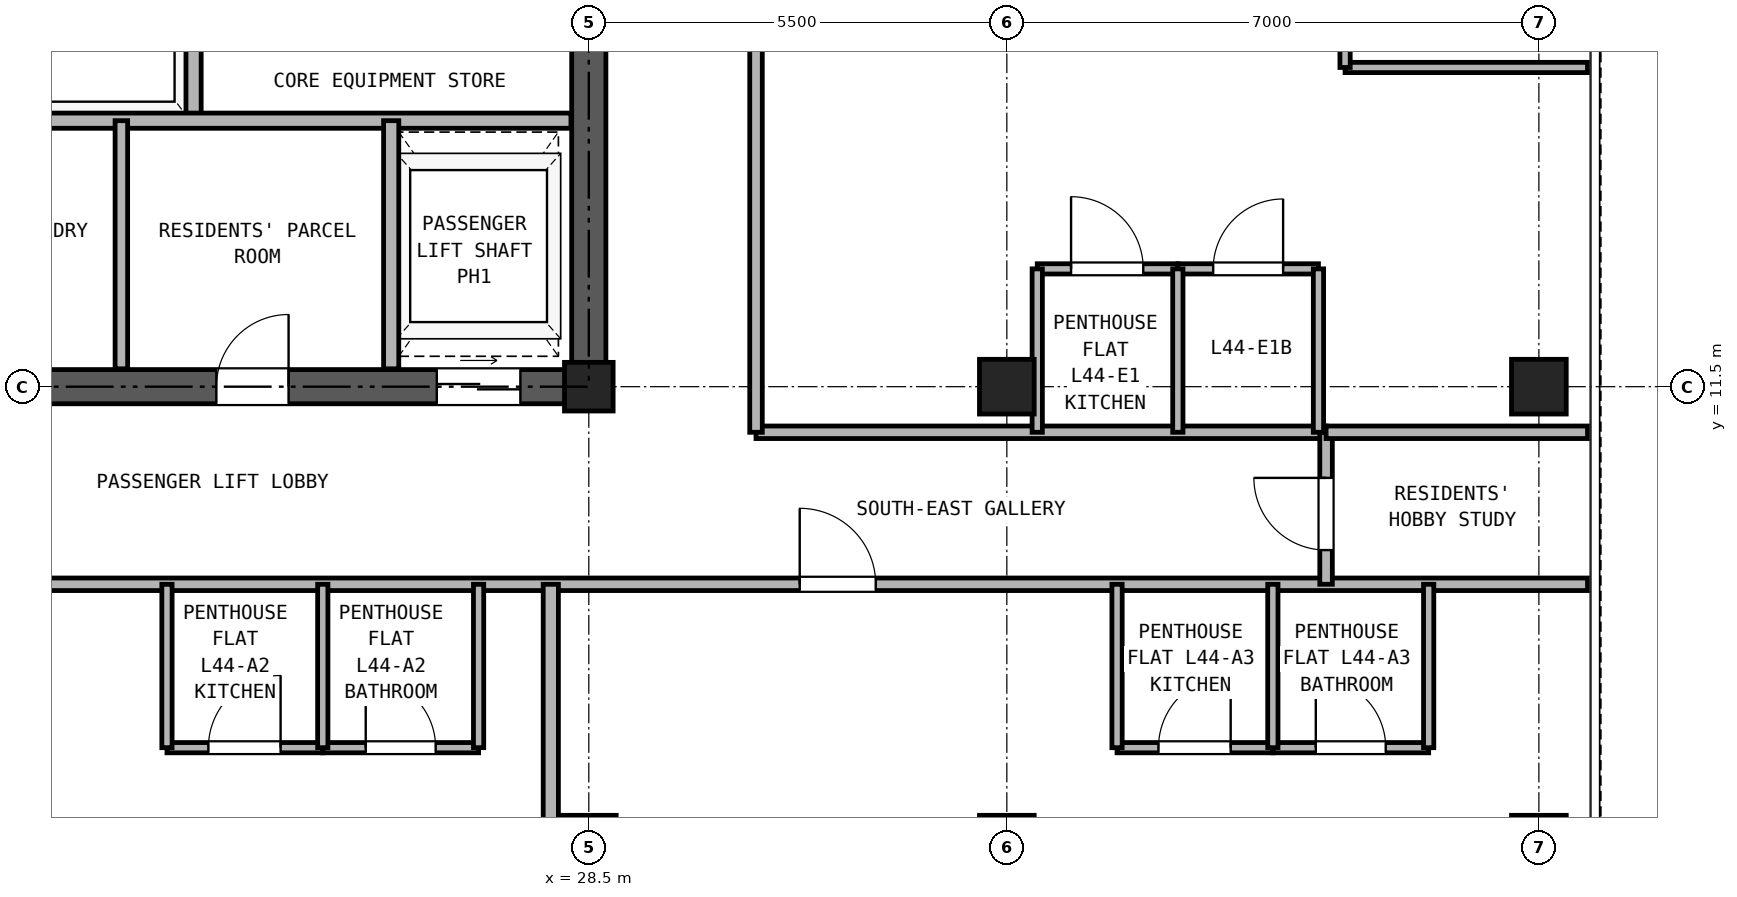
"""IFC4 building model, lengths in metres.
Left out: names, types, materials, properties, quantities, classifications, styles, units other than length and angle.
Written with IfcOpenShell. Run it as: python <this file> out.ifc"""

import sys

from ifc_helpers import new_model, si_unit, direction, frame, frame_2d, origin, origin_2d, place, context, subcontext, project, spatial, rectangle, hollow_rectangle, extrude, source, transform, mapped, element, fill, save


model = new_model("IFC4")
c1 = context("Model", 3, precision=1e-05, world=origin(), true_north=direction((0.0, 1.0)))
c2 = subcontext(c1, "Body", "Model", "MODEL_VIEW")
j1 = project(units=[si_unit("LENGTHUNIT", "METRE"), si_unit("PLANEANGLEUNIT", "RADIAN")], contexts=[c1])
p1 = place(None, origin())
s1 = spatial("IfcSite", under=j1, at=p1, CompositionType="ELEMENT")
p2 = place(p1, origin())
s2 = spatial("IfcBuilding", under=s1, at=p2, CompositionType="ELEMENT")
p3 = place(p2, frame((0.0, 0.0, 159.3)))
s3 = spatial("IfcBuildingStorey", under=s2, at=p3, CompositionType="ELEMENT", Elevation=159.3)
m1 = source(origin(), c2, "Body", "SweptSolid", [
    extrude(hollow_rectangle(XDim=0.72, YDim=0.72, WallThickness=0.04, at=origin_2d()), origin(), (0.0, 0.0, 1.0), 2.95),
])
for number, where, z_axis, x_axis in (
    (1, (41.0, 5.5, 0.0), (0.0, 0.0, 1.0), (1.0, 0.0, 0.0)),
    (2, (41.0, 11.5, 0.0), (0.0, 0.0, 1.0), (1.0, 0.0, 0.0)),
    (3, (28.5, 5.5, 0.0), (0.0, 0.0, 1.0), (1.0, 0.0, 0.0)),
):
    element("IfcColumn", number, at=place(p3, frame(where, z_axis=z_axis, x_axis=x_axis)), inside=s3, PredefinedType="COLUMN", context=c2, shape_type="MappedRepresentation", body=[
        mapped(m1, transform((0.0, 0.0, 0.0), x_axis=(1.0, 0.0, 0.0), y_axis=(0.0, 1.0, 0.0), z_axis=(0.0, 0.0, 1.0), scale=1.0)),
    ])
m2 = source(origin(), c2, "Body", "SweptSolid", [
    extrude(hollow_rectangle(XDim=0.64, YDim=0.64, WallThickness=0.035, at=origin_2d()), origin(), (0.0, 0.0, 1.0), 2.95),
])
p4 = place(p3, frame((28.5, 11.5, 0.0), z_axis=(0.0, 0.0, 1.0), x_axis=(1.0, 0.0, 0.0)))
e4 = element("IfcColumn", 4, at=p4, inside=s3, PredefinedType="COLUMN", context=c2, shape_type="MappedRepresentation", body=[
    mapped(m2, transform((0.0, 0.0, 0.0), x_axis=(1.0, 0.0, 0.0), y_axis=(0.0, 1.0, 0.0), z_axis=(0.0, 0.0, 1.0), scale=1.0)),
])
for number, where, z_axis, x_axis in (
    (5, (34.0, 5.5, 0.0), (0.0, 0.0, 1.0), (1.0, 0.0, 0.0)),
    (6, (34.0, 11.5, 0.0), (0.0, 0.0, 1.0), (1.0, 0.0, 0.0)),
):
    element("IfcColumn", number, at=place(p3, frame(where, z_axis=z_axis, x_axis=x_axis)), inside=s3, PredefinedType="COLUMN", context=c2, shape_type="MappedRepresentation", body=[
        mapped(m1, transform((0.0, 0.0, 0.0), x_axis=(1.0, 0.0, 0.0), y_axis=(0.0, 1.0, 0.0), z_axis=(0.0, 0.0, 1.0), scale=1.0)),
    ])
p5 = place(p3, frame((18.275, 11.5, 0.0), z_axis=(0.0, 0.0, 1.0), x_axis=(1.0, 0.0, 0.0)))
e7 = element("IfcWall", 7, at=p5, inside=s3, PredefinedType="SHEAR", context=c2, shape_type="SweptSolid", body=[
    extrude(rectangle(XDim=10.45, YDim=0.45, at=frame_2d((5.225, 0.0))), origin(), (0.0, 0.0, 1.0), 2.95),
])
p6 = place(p5, frame((1.825, 0.0, 0.0)))
e8 = element("IfcOpeningElement", 8, at=p6, cuts=e7, PredefinedType="OPENING", context=c2, shape_type="SweptSolid", body=[
    extrude(rectangle(XDim=0.95, YDim=2.15, at=frame_2d((0.475, 1.075))), frame((0.0, 0.235, 0.0), z_axis=(0.0, -1.0, 0.0), x_axis=(1.0, 0.0, 0.0)), (0.0, 0.0, 1.0), 0.47),
])
p7 = place(p5, frame((5.325, 0.0, 0.0)))
e9 = element("IfcOpeningElement", 9, at=p7, cuts=e7, PredefinedType="OPENING", context=c2, shape_type="SweptSolid", body=[
    extrude(rectangle(XDim=0.95, YDim=2.15, at=frame_2d((0.475, 1.075))), frame((0.0, 0.235, 0.0), z_axis=(0.0, -1.0, 0.0), x_axis=(1.0, 0.0, 0.0)), (0.0, 0.0, 1.0), 0.47),
])
p8 = place(p5, frame((8.225, 0.0, 0.0)))
e10 = element("IfcOpeningElement", 10, at=p8, cuts=e7, PredefinedType="OPENING", context=c2, shape_type="SweptSolid", body=[
    extrude(rectangle(XDim=1.1, YDim=2.25, at=frame_2d((0.55, 1.125))), frame((0.0, 0.235, 0.0), z_axis=(0.0, -1.0, 0.0), x_axis=(1.0, 0.0, 0.0)), (0.0, 0.0, 1.0), 0.47),
])
p9 = place(p3, frame((28.5, 11.725, 0.0), z_axis=(0.0, 0.0, 1.0), x_axis=(0.0, 1.0, 0.0)))
e11 = element("IfcWall", 11, at=p9, inside=s3, PredefinedType="SHEAR", context=c2, shape_type="SweptSolid", body=[
    extrude(rectangle(XDim=16.8, YDim=0.45, at=frame_2d((8.4, 0.0))), origin(), (0.0, 0.0, 1.0), 2.95),
])
p10 = place(p9, frame((7.425, 0.0, 0.0)))
e12 = element("IfcOpeningElement", 12, at=p10, cuts=e11, PredefinedType="OPENING", context=c2, shape_type="SweptSolid", body=[
    extrude(rectangle(XDim=1.15, YDim=2.2, at=frame_2d((0.575, 1.1))), frame((0.0, 0.235, 0.0), z_axis=(0.0, -1.0, 0.0), x_axis=(1.0, 0.0, 0.0)), (0.0, 0.0, 1.0), 0.47),
])
p11 = place(p3, frame((23.3, 15.0, 0.0), z_axis=(0.0, 0.0, 1.0), x_axis=(0.0, 1.0, 0.0)))
e13 = element("IfcWall", 13, at=p11, inside=s3, PredefinedType="PARTITIONING", context=c2, shape_type="SweptSolid", body=[
    extrude(rectangle(XDim=3.0, YDim=0.2, at=frame_2d((1.5, 0.0))), origin(), (0.0, 0.0, 1.0), 2.95),
])
p12 = place(p3, frame((18.735, 15.0, 0.0), z_axis=(0.0, 0.0, 1.0), x_axis=(1.0, 0.0, 0.0)))
e14 = element("IfcWall", 14, at=p12, inside=s3, PredefinedType="PARTITIONING", context=c2, shape_type="SweptSolid", body=[
    extrude(rectangle(XDim=9.53, YDim=0.2, at=frame_2d((4.765, 0.0))), origin(), (0.0, 0.0, 1.0), 2.95),
])
p13 = place(p3, frame((22.35, 11.735, 0.0), z_axis=(0.0, 0.0, 1.0), x_axis=(0.0, 1.0, 0.0)))
e15 = element("IfcWall", 15, at=p13, inside=s3, PredefinedType="PARTITIONING", context=c2, shape_type="SweptSolid", body=[
    extrude(rectangle(XDim=3.265, YDim=0.165, at=frame_2d((1.632, 0.0))), origin(), (0.0, 0.0, 1.0), 2.95),
])
p14 = place(p3, frame((25.9, 11.735, 0.0), z_axis=(0.0, 0.0, 1.0), x_axis=(0.0, 1.0, 0.0)))
e16 = element("IfcWall", 16, at=p14, inside=s3, PredefinedType="PARTITIONING", context=c2, shape_type="SweptSolid", body=[
    extrude(rectangle(XDim=3.265, YDim=0.2, at=frame_2d((1.632, 0.0))), origin(), (0.0, 0.0, 1.0), 2.95),
])
p15 = place(p3, frame((0.16, 8.9, 0.0), z_axis=(0.0, 0.0, 1.0), x_axis=(1.0, 0.0, 0.0)))
e17 = element("IfcWall", 17, at=p15, inside=s3, PredefinedType="PARTITIONING", context=c2, shape_type="SweptSolid", body=[
    extrude(rectangle(XDim=41.48, YDim=0.165, at=frame_2d((20.74, 0.0))), origin(), (0.0, 0.0, 1.0), 2.95),
])
p16 = place(p15, frame((12.165, 0.0, 0.0)))
e18 = element("IfcOpeningElement", 18, at=p16, cuts=e17, PredefinedType="OPENING", context=c2, shape_type="SweptSolid", body=[
    extrude(rectangle(XDim=1.0, YDim=2.15, at=frame_2d((0.5, 1.075))), frame((0.0, 0.093, 0.0), z_axis=(0.0, -1.0, 0.0), x_axis=(1.0, 0.0, 0.0)), (0.0, 0.0, 1.0), 0.185),
])
p17 = place(p15, frame((17.965, 0.0, 0.0)))
e19 = element("IfcOpeningElement", 19, at=p17, cuts=e17, PredefinedType="OPENING", context=c2, shape_type="SweptSolid", body=[
    extrude(rectangle(XDim=1.0, YDim=2.15, at=frame_2d((0.5, 1.075))), frame((0.0, 0.093, 0.0), z_axis=(0.0, -1.0, 0.0), x_axis=(1.0, 0.0, 0.0)), (0.0, 0.0, 1.0), 0.185),
])
p18 = place(p15, frame((31.115, 0.0, 0.0)))
e20 = element("IfcOpeningElement", 20, at=p18, cuts=e17, PredefinedType="OPENING", context=c2, shape_type="SweptSolid", body=[
    extrude(rectangle(XDim=1.0, YDim=2.15, at=frame_2d((0.5, 1.075))), frame((0.0, 0.093, 0.0), z_axis=(0.0, -1.0, 0.0), x_axis=(1.0, 0.0, 0.0)), (0.0, 0.0, 1.0), 0.185),
])
p19 = place(p3, frame((30.7, 10.9, 0.0), z_axis=(0.0, 0.0, 1.0), x_axis=(1.0, 0.0, 0.0)))
e21 = element("IfcWall", 21, at=p19, inside=s3, PredefinedType="PARTITIONING", context=c2, shape_type="SweptSolid", body=[
    extrude(rectangle(XDim=7.5, YDim=0.165, at=frame_2d((3.75, 0.0))), origin(), (0.0, 0.0, 1.0), 2.95),
])
p20 = place(p3, frame((38.2, 8.9, 0.0), z_axis=(0.0, 0.0, 1.0), x_axis=(0.0, 1.0, 0.0)))
e22 = element("IfcWall", 22, at=p20, inside=s3, PredefinedType="PARTITIONING", context=c2, shape_type="SweptSolid", body=[
    extrude(rectangle(XDim=2.0, YDim=0.165, at=frame_2d((1.0, 0.0))), origin(), (0.0, 0.0, 1.0), 2.95),
])
p21 = place(p20, frame((0.45, 0.0, 0.0)))
e23 = element("IfcOpeningElement", 23, at=p21, cuts=e22, PredefinedType="OPENING", context=c2, shape_type="SweptSolid", body=[
    extrude(rectangle(XDim=0.95, YDim=2.15, at=frame_2d((0.475, 1.075))), frame((0.0, 0.093, 0.0), z_axis=(0.0, -1.0, 0.0), x_axis=(1.0, 0.0, 0.0)), (0.0, 0.0, 1.0), 0.185),
])
p22 = place(p3, frame((30.7, 10.9, 0.0), z_axis=(0.0, 0.0, 1.0), x_axis=(0.0, 1.0, 0.0)))
e24 = element("IfcWall", 24, at=p22, inside=s3, PredefinedType="PARTITIONING", context=c2, shape_type="SweptSolid", body=[
    extrude(rectangle(XDim=24.24, YDim=0.165, at=frame_2d((12.12, 0.0))), origin(), (0.0, 0.0, 1.0), 2.95),
])
p23 = place(p22, frame((5.3, 0.0, 0.0)))
e25 = element("IfcOpeningElement", 25, at=p23, cuts=e24, PredefinedType="OPENING", context=c2, shape_type="SweptSolid", body=[
    extrude(rectangle(XDim=1.0, YDim=2.15, at=frame_2d((0.5, 1.075))), frame((0.0, 0.093, 0.0), z_axis=(0.0, -1.0, 0.0), x_axis=(1.0, 0.0, 0.0)), (0.0, 0.0, 1.0), 0.185),
])
p24 = place(p22, frame((15.05, 0.0, 0.0)))
e26 = element("IfcOpeningElement", 26, at=p24, cuts=e24, PredefinedType="OPENING", context=c2, shape_type="SweptSolid", body=[
    extrude(rectangle(XDim=1.0, YDim=2.15, at=frame_2d((0.5, 1.075))), frame((0.0, 0.093, 0.0), z_axis=(0.0, -1.0, 0.0), x_axis=(1.0, 0.0, 0.0)), (0.0, 0.0, 1.0), 0.185),
])
p25 = place(p3, frame((22.95, 6.75, 0.0), z_axis=(0.0, 0.0, 1.0), x_axis=(1.0, 0.0, 0.0)))
e27 = element("IfcWall", 27, at=p25, inside=s3, PredefinedType="PARTITIONING", context=c2, shape_type="SweptSolid", body=[
    extrude(rectangle(XDim=2.05, YDim=0.135, at=frame_2d((1.025, 0.0))), origin(), (0.0, 0.0, 1.0), 2.95),
])
p26 = place(p25, frame((0.545, 0.0, 0.0)))
e28 = element("IfcOpeningElement", 28, at=p26, cuts=e27, PredefinedType="OPENING", context=c2, shape_type="SweptSolid", body=[
    extrude(rectangle(XDim=0.95, YDim=2.15, at=frame_2d((0.475, 1.075))), frame((0.0, 0.077, 0.0), z_axis=(0.0, -1.0, 0.0), x_axis=(1.0, 0.0, 0.0)), (0.0, 0.0, 1.0), 0.155),
])
p27 = place(p3, frame((25.0, 6.75, 0.0), z_axis=(0.0, 0.0, 1.0), x_axis=(1.0, 0.0, 0.0)))
e29 = element("IfcWall", 29, at=p27, inside=s3, PredefinedType="PARTITIONING", context=c2, shape_type="SweptSolid", body=[
    extrude(rectangle(XDim=2.05, YDim=0.135, at=frame_2d((1.025, 0.0))), origin(), (0.0, 0.0, 1.0), 2.95),
])
p28 = place(p27, frame((0.565, 0.0, 0.0)))
e30 = element("IfcOpeningElement", 30, at=p28, cuts=e29, PredefinedType="OPENING", context=c2, shape_type="SweptSolid", body=[
    extrude(rectangle(XDim=0.92, YDim=2.1, at=frame_2d((0.46, 1.05))), frame((0.0, 0.077, 0.0), z_axis=(0.0, -1.0, 0.0), x_axis=(1.0, 0.0, 0.0)), (0.0, 0.0, 1.0), 0.155),
])
for number, where, z_axis, x_axis in (
    (31, (22.95, 6.75, 0.0), (0.0, 0.0, 1.0), (0.0, 1.0, 0.0)),
    (32, (25.0, 6.75, 0.0), (0.0, 0.0, 1.0), (0.0, 1.0, 0.0)),
    (33, (27.05, 6.75, 0.0), (0.0, 0.0, 1.0), (0.0, 1.0, 0.0)),
):
    element("IfcWall", number, at=place(p3, frame(where, z_axis=z_axis, x_axis=x_axis)), inside=s3, PredefinedType="PARTITIONING", context=c2, shape_type="SweptSolid", body=[
        extrude(rectangle(XDim=2.15, YDim=0.135, at=frame_2d((1.075, 0.0))), origin(), (0.0, 0.0, 1.0), 2.95),
    ])
p29 = place(p3, frame((28.0, 0.16, 0.0), z_axis=(0.0, 0.0, 1.0), x_axis=(0.0, 1.0, 0.0)))
e34 = element("IfcWall", 34, at=p29, inside=s3, PredefinedType="PARTITIONING", context=c2, shape_type="SweptSolid", body=[
    extrude(rectangle(XDim=8.74, YDim=0.2, at=frame_2d((4.37, 0.0))), origin(), (0.0, 0.0, 1.0), 2.95),
])
p30 = place(p3, frame((35.45, 6.75, 0.0), z_axis=(0.0, 0.0, 1.0), x_axis=(1.0, 0.0, 0.0)))
e35 = element("IfcWall", 35, at=p30, inside=s3, PredefinedType="PARTITIONING", context=c2, shape_type="SweptSolid", body=[
    extrude(rectangle(XDim=2.05, YDim=0.135, at=frame_2d((1.025, 0.0))), origin(), (0.0, 0.0, 1.0), 2.95),
])
p31 = place(p30, frame((0.545, 0.0, 0.0)))
e36 = element("IfcOpeningElement", 36, at=p31, cuts=e35, PredefinedType="OPENING", context=c2, shape_type="SweptSolid", body=[
    extrude(rectangle(XDim=0.95, YDim=2.15, at=frame_2d((0.475, 1.075))), frame((0.0, 0.077, 0.0), z_axis=(0.0, -1.0, 0.0), x_axis=(1.0, 0.0, 0.0)), (0.0, 0.0, 1.0), 0.155),
])
p32 = place(p3, frame((37.5, 6.75, 0.0), z_axis=(0.0, 0.0, 1.0), x_axis=(1.0, 0.0, 0.0)))
e37 = element("IfcWall", 37, at=p32, inside=s3, PredefinedType="PARTITIONING", context=c2, shape_type="SweptSolid", body=[
    extrude(rectangle(XDim=2.05, YDim=0.135, at=frame_2d((1.025, 0.0))), origin(), (0.0, 0.0, 1.0), 2.95),
])
p33 = place(p32, frame((0.565, 0.0, 0.0)))
e38 = element("IfcOpeningElement", 38, at=p33, cuts=e37, PredefinedType="OPENING", context=c2, shape_type="SweptSolid", body=[
    extrude(rectangle(XDim=0.92, YDim=2.1, at=frame_2d((0.46, 1.05))), frame((0.0, 0.077, 0.0), z_axis=(0.0, -1.0, 0.0), x_axis=(1.0, 0.0, 0.0)), (0.0, 0.0, 1.0), 0.155),
])
for number, where, z_axis, x_axis in (
    (39, (35.45, 6.75, 0.0), (0.0, 0.0, 1.0), (0.0, 1.0, 0.0)),
    (40, (37.5, 6.75, 0.0), (0.0, 0.0, 1.0), (0.0, 1.0, 0.0)),
    (41, (39.55, 6.75, 0.0), (0.0, 0.0, 1.0), (0.0, 1.0, 0.0)),
):
    element("IfcWall", number, at=place(p3, frame(where, z_axis=z_axis, x_axis=x_axis)), inside=s3, PredefinedType="PARTITIONING", context=c2, shape_type="SweptSolid", body=[
        extrude(rectangle(XDim=2.15, YDim=0.135, at=frame_2d((1.075, 0.0))), origin(), (0.0, 0.0, 1.0), 2.95),
    ])
p34 = place(p3, frame((38.2, 10.9, 0.0), z_axis=(0.0, 0.0, 1.0), x_axis=(1.0, 0.0, 0.0)))
e42 = element("IfcWall", 42, at=p34, inside=s3, PredefinedType="PARTITIONING", context=c2, shape_type="SweptSolid", body=[
    extrude(rectangle(XDim=3.44, YDim=0.165, at=frame_2d((1.72, 0.0))), origin(), (0.0, 0.0, 1.0), 2.95),
])
p35 = place(p3, frame((34.4, 13.05, 0.0), z_axis=(0.0, 0.0, 1.0), x_axis=(1.0, 0.0, 0.0)))
e43 = element("IfcWall", 43, at=p35, inside=s3, PredefinedType="PARTITIONING", context=c2, shape_type="SweptSolid", body=[
    extrude(rectangle(XDim=1.85, YDim=0.135, at=frame_2d((0.925, 0.0))), origin(), (0.0, 0.0, 1.0), 2.95),
])
p36 = place(p35, frame((0.445, 0.0, 0.0)))
e44 = element("IfcOpeningElement", 44, at=p36, cuts=e43, PredefinedType="OPENING", context=c2, shape_type="SweptSolid", body=[
    extrude(rectangle(XDim=0.95, YDim=2.15, at=frame_2d((0.475, 1.075))), frame((0.0, 0.077, 0.0), z_axis=(0.0, -1.0, 0.0), x_axis=(1.0, 0.0, 0.0)), (0.0, 0.0, 1.0), 0.155),
])
p37 = place(p3, frame((36.25, 13.05, 0.0), z_axis=(0.0, 0.0, 1.0), x_axis=(1.0, 0.0, 0.0)))
e45 = element("IfcWall", 45, at=p37, inside=s3, PredefinedType="PARTITIONING", context=c2, shape_type="SweptSolid", body=[
    extrude(rectangle(XDim=1.85, YDim=0.135, at=frame_2d((0.925, 0.0))), origin(), (0.0, 0.0, 1.0), 2.95),
])
p38 = place(p37, frame((0.465, 0.0, 0.0)))
e46 = element("IfcOpeningElement", 46, at=p38, cuts=e45, PredefinedType="OPENING", context=c2, shape_type="SweptSolid", body=[
    extrude(rectangle(XDim=0.92, YDim=2.1, at=frame_2d((0.46, 1.05))), frame((0.0, 0.077, 0.0), z_axis=(0.0, -1.0, 0.0), x_axis=(1.0, 0.0, 0.0)), (0.0, 0.0, 1.0), 0.155),
])
for number, where, z_axis, x_axis in (
    (47, (34.4, 10.9, 0.0), (0.0, 0.0, 1.0), (0.0, 1.0, 0.0)),
    (48, (36.25, 10.9, 0.0), (0.0, 0.0, 1.0), (0.0, 1.0, 0.0)),
    (49, (38.1, 10.9, 0.0), (0.0, 0.0, 1.0), (0.0, 1.0, 0.0)),
):
    element("IfcWall", number, at=place(p3, frame(where, z_axis=z_axis, x_axis=x_axis)), inside=s3, PredefinedType="PARTITIONING", context=c2, shape_type="SweptSolid", body=[
        extrude(rectangle(XDim=2.15, YDim=0.135, at=frame_2d((1.075, 0.0))), origin(), (0.0, 0.0, 1.0), 2.95),
    ])
p39 = place(p3, frame((38.45, 15.7, 0.0), z_axis=(0.0, 0.0, 1.0), x_axis=(1.0, 0.0, 0.0)))
e50 = element("IfcWall", 50, at=p39, inside=s3, PredefinedType="PARTITIONING", context=c2, shape_type="SweptSolid", body=[
    extrude(rectangle(XDim=3.19, YDim=0.135, at=frame_2d((1.595, 0.0))), origin(), (0.0, 0.0, 1.0), 2.95),
])
p40 = place(p3, frame((38.45, 15.7, 0.0), z_axis=(0.0, 0.0, 1.0), x_axis=(0.0, 1.0, 0.0)))
e51 = element("IfcWall", 51, at=p40, inside=s3, PredefinedType="PARTITIONING", context=c2, shape_type="SweptSolid", body=[
    extrude(rectangle(XDim=3.4, YDim=0.135, at=frame_2d((1.7, 0.0))), origin(), (0.0, 0.0, 1.0), 2.95),
])
p41 = place(p40, frame((1.22, 0.0, 0.0)))
e52 = element("IfcOpeningElement", 52, at=p41, cuts=e51, PredefinedType="OPENING", context=c2, shape_type="SweptSolid", body=[
    extrude(rectangle(XDim=0.95, YDim=2.15, at=frame_2d((0.475, 1.075))), frame((0.0, 0.077, 0.0), z_axis=(0.0, -1.0, 0.0), x_axis=(1.0, 0.0, 0.0)), (0.0, 0.0, 1.0), 0.155),
])
p42 = place(p7, frame((0.95, 0.0, 0.0), z_axis=(0.0, 0.0, 1.0), x_axis=(-1.0, 0.0, 0.0)))
e53 = element("IfcDoor", 53, at=p42, inside=s3, OperationType="SINGLE_SWING_RIGHT", PredefinedType="DOOR", context=c2, shape_type="SweptSolid", body=[
    extrude(rectangle(XDim=0.95, YDim=2.15, at=frame_2d((0.475, 1.075))), frame((0.0, 0.025, 0.0), z_axis=(0.0, -1.0, 0.0), x_axis=(1.0, 0.0, 0.0)), (0.0, 0.0, 1.0), 0.05),
])
fill(e9, e53)
p43 = place(p8, frame((1.1, 0.0, 0.0), z_axis=(0.0, 0.0, 1.0), x_axis=(-1.0, 0.0, 0.0)))
e54 = element("IfcDoor", 54, at=p43, inside=s3, OperationType="DOUBLE_DOOR_SLIDING", PredefinedType="DOOR", context=c2, shape_type="SweptSolid", body=[
    extrude(rectangle(XDim=1.1, YDim=2.25, at=frame_2d((0.55, 1.125))), frame((0.0, 0.025, 0.0), z_axis=(0.0, -1.0, 0.0), x_axis=(1.0, 0.0, 0.0)), (0.0, 0.0, 1.0), 0.05),
])
fill(e10, e54)
p44 = place(p26, origin())
e55 = element("IfcDoor", 55, at=p44, inside=s3, OperationType="SINGLE_SWING_RIGHT", PredefinedType="DOOR", context=c2, shape_type="SweptSolid", body=[
    extrude(rectangle(XDim=0.95, YDim=2.15, at=frame_2d((0.475, 1.075))), frame((0.0, 0.025, 0.0), z_axis=(0.0, -1.0, 0.0), x_axis=(1.0, 0.0, 0.0)), (0.0, 0.0, 1.0), 0.05),
])
fill(e28, e55)
p45 = place(p28, origin())
e56 = element("IfcDoor", 56, at=p45, inside=s3, OperationType="SINGLE_SWING_LEFT", PredefinedType="DOOR", context=c2, shape_type="SweptSolid", body=[
    extrude(rectangle(XDim=0.92, YDim=2.1, at=frame_2d((0.46, 1.05))), frame((0.0, 0.025, 0.0), z_axis=(0.0, -1.0, 0.0), x_axis=(1.0, 0.0, 0.0)), (0.0, 0.0, 1.0), 0.05),
])
fill(e30, e56)
p46 = place(p31, origin())
e57 = element("IfcDoor", 57, at=p46, inside=s3, OperationType="SINGLE_SWING_RIGHT", PredefinedType="DOOR", context=c2, shape_type="SweptSolid", body=[
    extrude(rectangle(XDim=0.95, YDim=2.15, at=frame_2d((0.475, 1.075))), frame((0.0, 0.025, 0.0), z_axis=(0.0, -1.0, 0.0), x_axis=(1.0, 0.0, 0.0)), (0.0, 0.0, 1.0), 0.05),
])
fill(e36, e57)
p47 = place(p33, origin())
e58 = element("IfcDoor", 58, at=p47, inside=s3, OperationType="SINGLE_SWING_LEFT", PredefinedType="DOOR", context=c2, shape_type="SweptSolid", body=[
    extrude(rectangle(XDim=0.92, YDim=2.1, at=frame_2d((0.46, 1.05))), frame((0.0, 0.025, 0.0), z_axis=(0.0, -1.0, 0.0), x_axis=(1.0, 0.0, 0.0)), (0.0, 0.0, 1.0), 0.05),
])
fill(e38, e58)
p48 = place(p18, frame((1.0, 0.0, 0.0), z_axis=(0.0, 0.0, 1.0), x_axis=(-1.0, 0.0, 0.0)))
e59 = element("IfcDoor", 59, at=p48, inside=s3, OperationType="SINGLE_SWING_LEFT", PredefinedType="DOOR", context=c2, shape_type="SweptSolid", body=[
    extrude(rectangle(XDim=1.0, YDim=2.15, at=frame_2d((0.5, 1.075))), frame((0.0, 0.025, 0.0), z_axis=(0.0, -1.0, 0.0), x_axis=(1.0, 0.0, 0.0)), (0.0, 0.0, 1.0), 0.05),
])
fill(e20, e59)
p49 = place(p21, origin())
e60 = element("IfcDoor", 60, at=p49, inside=s3, OperationType="SINGLE_SWING_RIGHT", PredefinedType="DOOR", context=c2, shape_type="SweptSolid", body=[
    extrude(rectangle(XDim=0.95, YDim=2.15, at=frame_2d((0.475, 1.075))), frame((0.0, 0.025, 0.0), z_axis=(0.0, -1.0, 0.0), x_axis=(1.0, 0.0, 0.0)), (0.0, 0.0, 1.0), 0.05),
])
fill(e23, e60)
p50 = place(p36, origin())
e61 = element("IfcDoor", 61, at=p50, inside=s3, OperationType="SINGLE_SWING_LEFT", PredefinedType="DOOR", context=c2, shape_type="SweptSolid", body=[
    extrude(rectangle(XDim=0.95, YDim=2.15, at=frame_2d((0.475, 1.075))), frame((0.0, 0.025, 0.0), z_axis=(0.0, -1.0, 0.0), x_axis=(1.0, 0.0, 0.0)), (0.0, 0.0, 1.0), 0.05),
])
fill(e44, e61)
p51 = place(p38, origin())
e62 = element("IfcDoor", 62, at=p51, inside=s3, OperationType="SINGLE_SWING_RIGHT", PredefinedType="DOOR", context=c2, shape_type="SweptSolid", body=[
    extrude(rectangle(XDim=0.92, YDim=2.1, at=frame_2d((0.46, 1.05))), frame((0.0, 0.025, 0.0), z_axis=(0.0, -1.0, 0.0), x_axis=(1.0, 0.0, 0.0)), (0.0, 0.0, 1.0), 0.05),
])
fill(e46, e62)
save(model, sys.argv[1])
